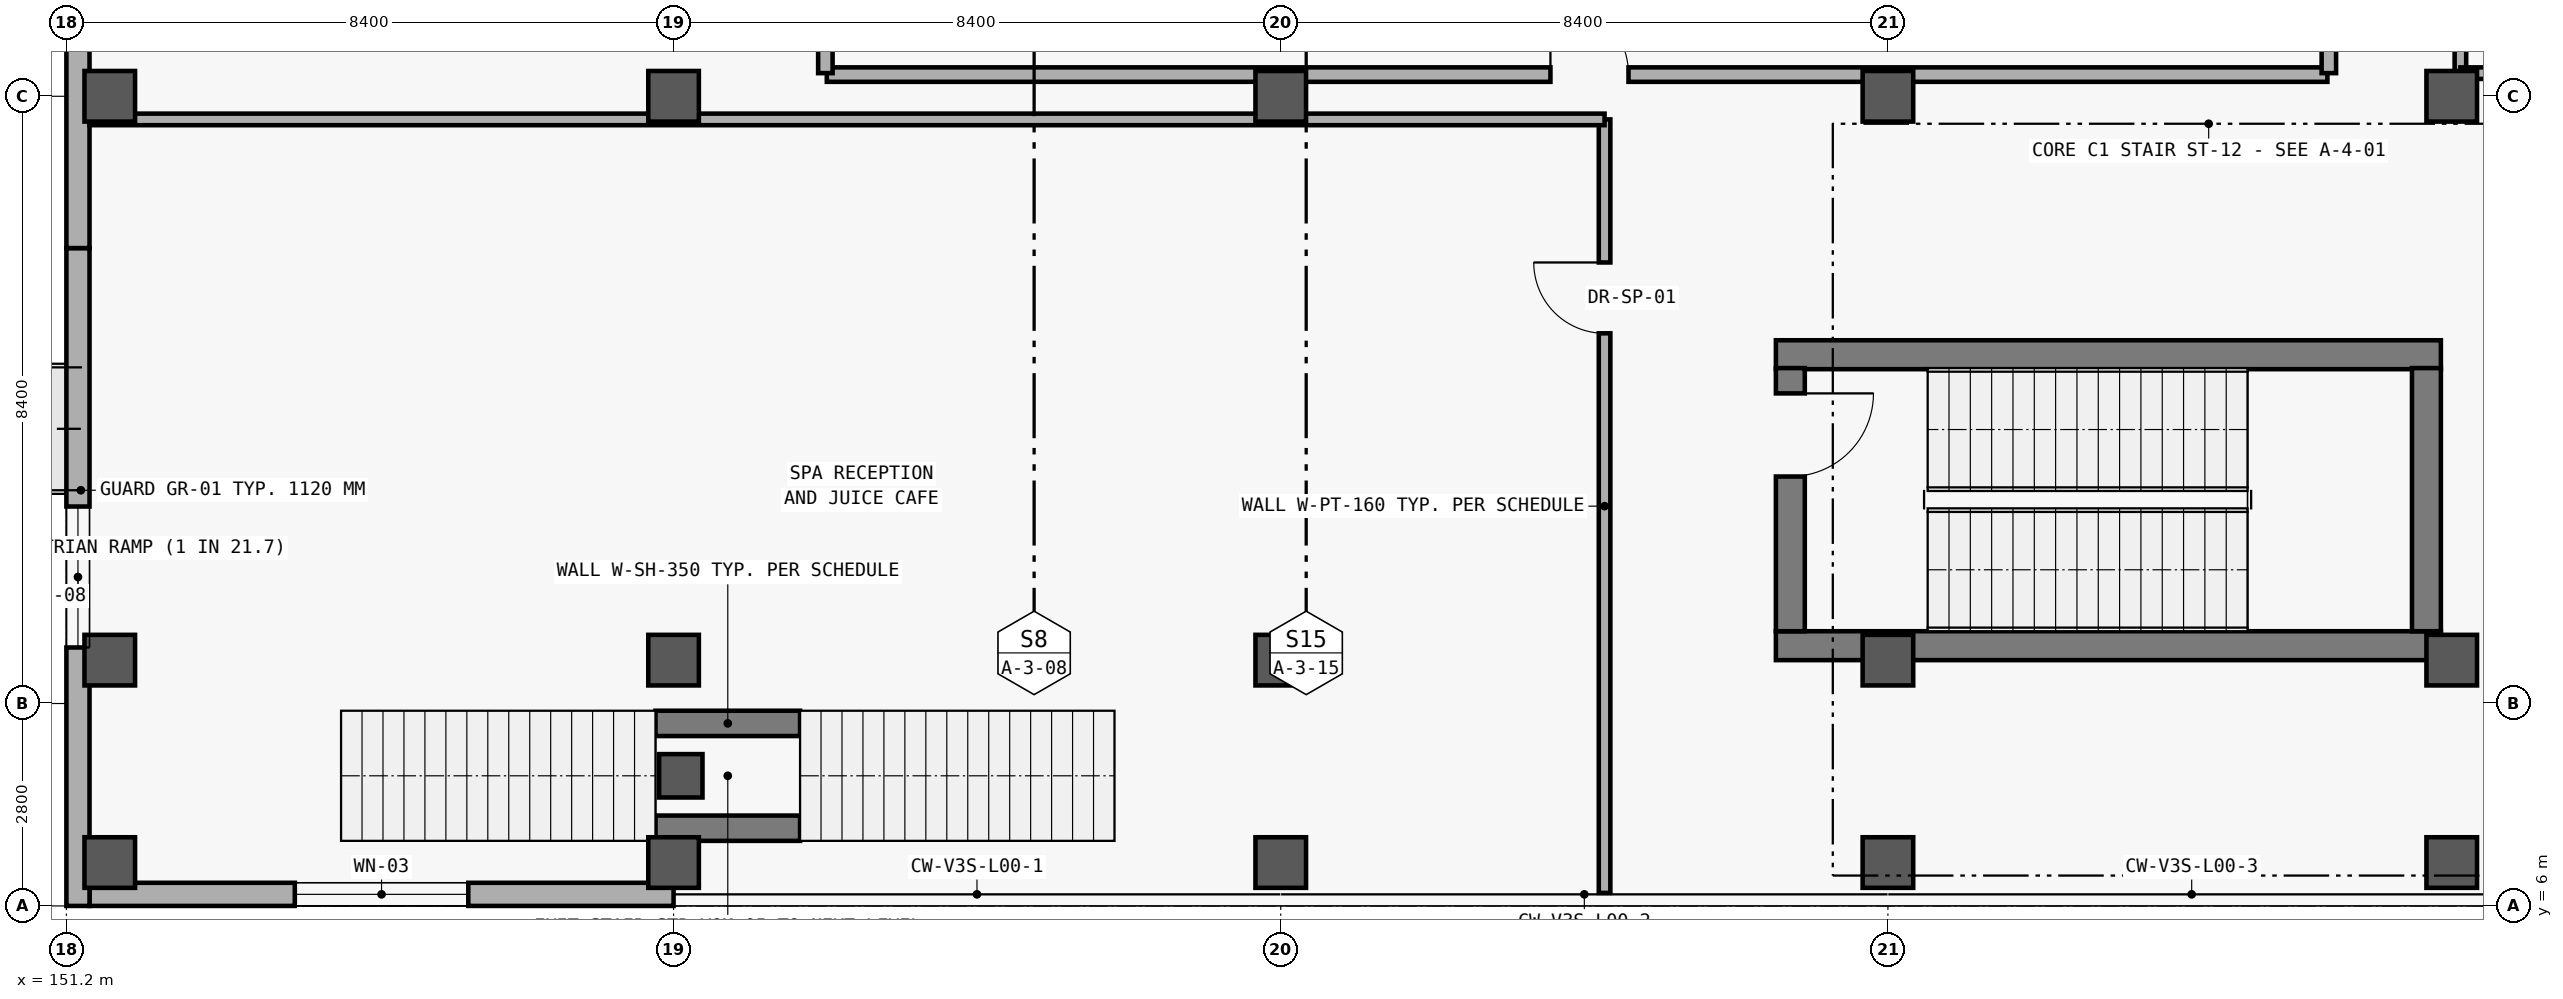
"""IFC4 building model, lengths in metres.
Left out: names, types, materials, properties, quantities, classifications, styles, units other than length and angle.
Written with IfcOpenShell. Run it as: python <this file> out.ifc"""

import sys

from ifc_helpers import new_model, si_unit, direction, frame, frame_2d, origin, origin_2d, place, context, subcontext, project, spatial, rectangle, extrude, element, fill, save


model = new_model("IFC4")
c1 = context("Model", 3, precision=1e-05, world=origin(), true_north=direction((0.0, 1.0)))
c2 = subcontext(c1, "Body", "Model", "MODEL_VIEW")
j1 = project(units=[si_unit("LENGTHUNIT", "METRE"), si_unit("PLANEANGLEUNIT", "RADIAN")], contexts=[c1])
p1 = place(None, origin())
s1 = spatial("IfcSite", under=j1, at=p1, CompositionType="ELEMENT")
p2 = place(p1, origin())
s2 = spatial("IfcBuilding", under=s1, at=p2, CompositionType="ELEMENT")
p3 = place(p2, origin())
s3 = spatial("IfcBuildingStorey", under=s2, at=p3, CompositionType="ELEMENT", Elevation=0.0)
for number, where, z_axis, x_axis in (
    (1, (151.8, 6.6, 0.0), (0.0, 0.0, 1.0), (1.0, 0.0, 0.0)),
    (2, (151.8, 9.4, 0.0), (0.0, 0.0, 1.0), (1.0, 0.0, 0.0)),
    (3, (151.8, 17.2, 0.0), (0.0, 0.0, 1.0), (1.0, 0.0, 0.0)),
    (4, (159.6, 6.6, 0.0), (0.0, 0.0, 1.0), (1.0, 0.0, 0.0)),
    (5, (159.6, 9.4, 0.0), (0.0, 0.0, 1.0), (1.0, 0.0, 0.0)),
    (6, (159.6, 17.2, 0.0), (0.0, 0.0, 1.0), (1.0, 0.0, 0.0)),
    (7, (168.0, 6.6, 0.0), (0.0, 0.0, 1.0), (1.0, 0.0, 0.0)),
    (8, (168.0, 9.4, 0.0), (0.0, 0.0, 1.0), (1.0, 0.0, 0.0)),
    (9, (168.0, 17.2, 0.0), (0.0, 0.0, 1.0), (1.0, 0.0, 0.0)),
    (10, (176.4, 6.6, 0.0), (0.0, 0.0, 1.0), (1.0, 0.0, 0.0)),
    (11, (176.4, 9.4, 0.0), (0.0, 0.0, 1.0), (1.0, 0.0, 0.0)),
    (12, (176.4, 17.2, 0.0), (0.0, 0.0, 1.0), (1.0, 0.0, 0.0)),
    (13, (184.2, 6.6, 0.0), (0.0, 0.0, 1.0), (1.0, 0.0, 0.0)),
    (14, (184.2, 9.4, 0.0), (0.0, 0.0, 1.0), (1.0, 0.0, 0.0)),
    (15, (184.2, 17.2, 0.0), (0.0, 0.0, 1.0), (1.0, 0.0, 0.0)),
):
    element("IfcColumn", number, at=place(p3, frame(where, z_axis=z_axis, x_axis=x_axis)), inside=s3, PredefinedType="COLUMN", context=c2, shape_type="SweptSolid", body=[
        extrude(rectangle(XDim=0.7, YDim=0.7, at=origin_2d()), origin(), (0.0, 0.0, 1.0), 5.4),
    ])
p4 = place(p3, frame((159.6, 6.16, 0.0), z_axis=(0.0, 0.0, 1.0), x_axis=(-1.0, 0.0, 0.0)))
e16 = element("IfcWall", 16, at=p4, inside=s3, PredefinedType="SOLIDWALL", context=c2, shape_type="SweptSolid", body=[
    extrude(rectangle(XDim=8.08, YDim=0.32, at=frame_2d((4.04, 0.0))), origin(), (0.0, 0.0, 1.0), 5.1),
])
p5 = place(p4, frame((2.84, 0.0, 0.9)))
e17 = element("IfcOpeningElement", 17, at=p5, cuts=e16, PredefinedType="OPENING", context=c2, shape_type="SweptSolid", body=[
    extrude(rectangle(XDim=2.4, YDim=1.8, at=frame_2d((1.2, 0.9))), frame((0.0, 0.17, 0.0), z_axis=(0.0, -1.0, 0.0), x_axis=(1.0, 0.0, 0.0)), (0.0, 0.0, 1.0), 0.34),
])
p6 = place(p3, frame((151.36, 6.0, 0.0), z_axis=(0.0, 0.0, 1.0), x_axis=(0.0, 1.0, 0.0)))
e18 = element("IfcWall", 18, at=p6, inside=s3, PredefinedType="SOLIDWALL", context=c2, shape_type="SweptSolid", body=[
    extrude(rectangle(XDim=9.1, YDim=0.32, at=frame_2d((4.55, 0.0))), origin(), (0.0, 0.0, 1.0), 5.1),
])
p7 = place(p6, frame((3.575, 0.0, 0.9)))
e19 = element("IfcOpeningElement", 19, at=p7, cuts=e18, PredefinedType="OPENING", context=c2, shape_type="SweptSolid", body=[
    extrude(rectangle(XDim=1.95, YDim=1.75, at=frame_2d((0.975, 0.875))), frame((0.0, 0.17, 0.0), z_axis=(0.0, -1.0, 0.0), x_axis=(1.0, 0.0, 0.0)), (0.0, 0.0, 1.0), 0.34),
])
p8 = place(p3, frame((151.36, 15.1, 0.0), z_axis=(0.0, 0.0, 1.0), x_axis=(0.0, 1.0, 0.0)))
e20 = element("IfcWall", 20, at=p8, inside=s3, PredefinedType="SOLIDWALL", context=c2, shape_type="SweptSolid", body=[
    extrude(rectangle(XDim=9.1, YDim=0.32, at=frame_2d((4.55, 0.0))), origin(), (0.0, 0.0, 1.0), 5.1),
])
p9 = place(p8, frame((3.275, 0.0, 0.9)))
e21 = element("IfcOpeningElement", 21, at=p9, cuts=e20, PredefinedType="OPENING", context=c2, shape_type="SweptSolid", body=[
    extrude(rectangle(XDim=2.55, YDim=1.8, at=frame_2d((1.275, 0.9))), frame((0.0, 0.17, 0.0), z_axis=(0.0, -1.0, 0.0), x_axis=(1.0, 0.0, 0.0)), (0.0, 0.0, 1.0), 0.34),
])
for number, where, z_axis, x_axis in (
    (22, (174.85, 9.6, 0.0), (0.0, 0.0, 1.0), (1.0, 0.0, 0.0)),
    (23, (184.05, 13.625, 0.0), (0.0, 0.0, 1.0), (-1.0, 0.0, 0.0)),
):
    element("IfcWall", number, at=place(p3, frame(where, z_axis=z_axis, x_axis=x_axis)), inside=s3, PredefinedType="SHEAR", context=c2, shape_type="SweptSolid", body=[
        extrude(rectangle(XDim=9.2, YDim=0.4, at=frame_2d((4.6, 0.0))), origin(), (0.0, 0.0, 1.0), 5.08),
    ])
p10 = place(p3, frame((175.05, 13.44, 0.0), z_axis=(0.0, 0.0, 1.0), x_axis=(0.0, -1.0, 0.0)))
e24 = element("IfcWall", 24, at=p10, inside=s3, PredefinedType="SHEAR", context=c2, shape_type="SweptSolid", body=[
    extrude(rectangle(XDim=3.64, YDim=0.4, at=frame_2d((1.82, 0.0))), origin(), (0.0, 0.0, 1.0), 5.08),
])
p11 = place(p10, frame((0.35, 0.0, 0.0)))
e25 = element("IfcOpeningElement", 25, at=p11, cuts=e24, PredefinedType="OPENING", context=c2, shape_type="SweptSolid", body=[
    extrude(rectangle(XDim=1.15, YDim=2.2, at=frame_2d((0.575, 1.1))), frame((0.0, 0.21, 0.0), z_axis=(0.0, -1.0, 0.0), x_axis=(1.0, 0.0, 0.0)), (0.0, 0.0, 1.0), 0.42),
])
p12 = place(p3, frame((183.85, 9.8, 0.0), z_axis=(0.0, 0.0, 1.0), x_axis=(0.0, 1.0, 0.0)))
e26 = element("IfcWall", 26, at=p12, inside=s3, PredefinedType="SHEAR", context=c2, shape_type="SweptSolid", body=[
    extrude(rectangle(XDim=3.64, YDim=0.4, at=frame_2d((1.82, 0.0))), origin(), (0.0, 0.0, 1.0), 5.08),
])
for number, where, z_axis, x_axis in (
    (27, (159.35, 7.075, 0.0), (0.0, 0.0, 1.0), (1.0, 0.0, 0.0)),
    (28, (159.35, 8.525, 0.0), (0.0, 0.0, 1.0), (1.0, 0.0, 0.0)),
):
    element("IfcWall", number, at=place(p3, frame(where, z_axis=z_axis, x_axis=x_axis)), inside=s3, PredefinedType="SHEAR", context=c2, shape_type="SweptSolid", body=[
        extrude(rectangle(XDim=2.0, YDim=0.35, at=frame_2d((1.0, 0.0))), origin(), (0.0, 0.0, 1.0), 2.5),
    ])
p13 = place(p3, frame((159.7, 7.8, 0.0), z_axis=(0.0, 0.0, 1.0), x_axis=(1.0, 0.0, 0.0)))
e29 = element("IfcColumn", 29, at=p13, inside=s3, PredefinedType="COLUMN", context=c2, shape_type="SweptSolid", body=[
    extrude(rectangle(XDim=0.6, YDim=0.6, at=origin_2d()), origin(), (0.0, 0.0, 1.0), 2.5),
])
p14 = place(p3, frame((161.72, 17.5, 0.0), z_axis=(0.0, 0.0, 1.0), x_axis=(1.0, 0.0, 0.0)))
e30 = element("IfcWall", 30, at=p14, inside=s3, PredefinedType="SOLIDWALL", context=c2, shape_type="SweptSolid", body=[
    extrude(rectangle(XDim=20.76, YDim=0.2, at=frame_2d((10.38, 0.0))), origin(), (0.0, 0.0, 1.0), 4.18),
])
p15 = place(p14, frame((10.011, 0.0, 0.0)))
e31 = element("IfcOpeningElement", 31, at=p15, cuts=e30, PredefinedType="OPENING", context=c2, shape_type="SweptSolid", body=[
    extrude(rectangle(XDim=1.08, YDim=2.25, at=frame_2d((0.54, 1.125))), frame((0.0, 0.11, 0.0), z_axis=(0.0, -1.0, 0.0), x_axis=(1.0, 0.0, 0.0)), (0.0, 0.0, 1.0), 0.22),
])
p16 = place(p3, frame((172.48, 6.18, 0.0), z_axis=(0.0, 0.0, 1.0), x_axis=(0.0, 1.0, 0.0)))
e32 = element("IfcWall", 32, at=p16, inside=s3, PredefinedType="PARTITIONING", context=c2, shape_type="SweptSolid", body=[
    extrude(rectangle(XDim=10.7, YDim=0.16, at=frame_2d((5.35, 0.0))), origin(), (0.0, 0.0, 1.0), 4.18),
])
p17 = place(p16, frame((7.741, 0.0, 0.0)))
e33 = element("IfcOpeningElement", 33, at=p17, cuts=e32, PredefinedType="OPENING", context=c2, shape_type="SweptSolid", body=[
    extrude(rectangle(XDim=0.98, YDim=2.2, at=frame_2d((0.49, 1.1))), frame((0.0, 0.09, 0.0), z_axis=(0.0, -1.0, 0.0), x_axis=(1.0, 0.0, 0.0)), (0.0, 0.0, 1.0), 0.18),
])
p18 = place(p3, frame((184.32, 17.52, 0.0), z_axis=(0.0, 0.0, 1.0), x_axis=(0.0, 1.0, 0.0)))
e34 = element("IfcWall", 34, at=p18, inside=s3, PredefinedType="PARTITIONING", context=c2, shape_type="SweptSolid", body=[
    extrude(rectangle(XDim=16.56, YDim=0.16, at=frame_2d((8.28, 0.0))), origin(), (0.0, 0.0, 1.0), 4.18),
])
p19 = place(p18, frame((3.091, 0.0, 0.0)))
e35 = element("IfcOpeningElement", 35, at=p19, cuts=e34, PredefinedType="OPENING", context=c2, shape_type="SweptSolid", body=[
    extrude(rectangle(XDim=1.65, YDim=2.35, at=frame_2d((0.825, 1.175))), frame((0.0, 0.09, 0.0), z_axis=(0.0, -1.0, 0.0), x_axis=(1.0, 0.0, 0.0)), (0.0, 0.0, 1.0), 0.18),
])
for number, where, z_axis, x_axis in (
    (36, (161.7, 17.52, 0.0), (0.0, 0.0, 1.0), (0.0, 1.0, 0.0)),
    (37, (182.5, 17.52, 0.0), (0.0, 0.0, 1.0), (0.0, 1.0, 0.0)),
):
    element("IfcWall", number, at=place(p3, frame(where, z_axis=z_axis, x_axis=x_axis)), inside=s3, PredefinedType="SOLIDWALL", context=c2, shape_type="SweptSolid", body=[
        extrude(rectangle(XDim=16.16, YDim=0.2, at=frame_2d((8.08, 0.0))), origin(), (0.0, 0.0, 1.0), 4.18),
    ])
p20 = place(p3, frame((151.52, 16.88, 0.0), z_axis=(0.0, 0.0, 1.0), x_axis=(1.0, 0.0, 0.0)))
e38 = element("IfcWall", 38, at=p20, inside=s3, PredefinedType="PARTITIONING", context=c2, shape_type="SweptSolid", body=[
    extrude(rectangle(XDim=20.96, YDim=0.16, at=frame_2d((10.48, 0.0))), origin(), (0.0, 0.0, 1.0), 4.18),
])
p21 = place(p3, frame((184.32, 17.52, 0.0), z_axis=(0.0, 0.0, 1.0), x_axis=(1.0, 0.0, 0.0)))
e39 = element("IfcWall", 39, at=p21, inside=s3, PredefinedType="PARTITIONING", context=c2, shape_type="SweptSolid", body=[
    extrude(rectangle(XDim=8.56, YDim=0.16, at=frame_2d((4.28, 0.0))), origin(), (0.0, 0.0, 1.0), 4.18),
])
p22 = place(p5, origin())
e40 = element("IfcWindow", 40, at=p22, inside=s3, PartitioningType="SINGLE_PANEL", PredefinedType="WINDOW", context=c2, shape_type="SweptSolid", body=[
    extrude(rectangle(XDim=2.4, YDim=1.8, at=frame_2d((1.2, 0.9))), frame((0.0, 0.03, 0.0), z_axis=(0.0, -1.0, 0.0), x_axis=(1.0, 0.0, 0.0)), (0.0, 0.0, 1.0), 0.06),
])
fill(e17, e40)
p23 = place(p7, origin())
e41 = element("IfcWindow", 41, at=p23, inside=s3, PartitioningType="SINGLE_PANEL", PredefinedType="WINDOW", context=c2, shape_type="SweptSolid", body=[
    extrude(rectangle(XDim=1.95, YDim=1.75, at=frame_2d((0.975, 0.875))), frame((0.0, 0.03, 0.0), z_axis=(0.0, -1.0, 0.0), x_axis=(1.0, 0.0, 0.0)), (0.0, 0.0, 1.0), 0.06),
])
fill(e19, e41)
p24 = place(p11, origin())
e42 = element("IfcDoor", 42, at=p24, inside=s3, OperationType="SINGLE_SWING_LEFT", PredefinedType="DOOR", context=c2, shape_type="SweptSolid", body=[
    extrude(rectangle(XDim=1.15, YDim=2.2, at=frame_2d((0.575, 1.1))), frame((0.0, 0.025, 0.0), z_axis=(0.0, -1.0, 0.0), x_axis=(1.0, 0.0, 0.0)), (0.0, 0.0, 1.0), 0.05),
])
fill(e25, e42)
p25 = place(p15, origin())
e43 = element("IfcDoor", 43, at=p25, inside=s3, OperationType="SINGLE_SWING_LEFT", PredefinedType="DOOR", context=c2, shape_type="SweptSolid", body=[
    extrude(rectangle(XDim=1.08, YDim=2.25, at=frame_2d((0.54, 1.125))), frame((0.0, 0.025, 0.0), z_axis=(0.0, -1.0, 0.0), x_axis=(1.0, 0.0, 0.0)), (0.0, 0.0, 1.0), 0.05),
])
fill(e31, e43)
p26 = place(p17, origin())
e44 = element("IfcDoor", 44, at=p26, inside=s3, OperationType="SINGLE_SWING_RIGHT", PredefinedType="DOOR", context=c2, shape_type="SweptSolid", body=[
    extrude(rectangle(XDim=0.98, YDim=2.2, at=frame_2d((0.49, 1.1))), frame((0.0, 0.025, 0.0), z_axis=(0.0, -1.0, 0.0), x_axis=(1.0, 0.0, 0.0)), (0.0, 0.0, 1.0), 0.05),
])
fill(e33, e44)
save(model, sys.argv[1])
